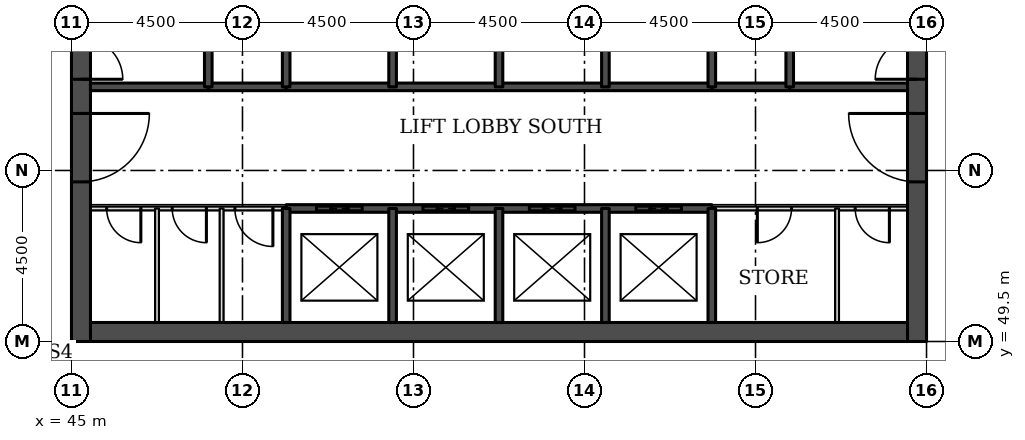
"""IFC4 building model, lengths in metres.
Left out: names, types, materials, properties, quantities, classifications, styles, units other than length and angle.
Written with IfcOpenShell. Run it as: python <this file> out.ifc"""

import sys

from ifc_helpers import new_model, si_unit, direction, frame, frame_2d, origin, place, context, subcontext, project, spatial, rectangle, extrude, element, fill, save


model = new_model("IFC4")
c1 = context("Model", 3, precision=1e-05, world=origin(), true_north=direction((0.0, 1.0)))
c2 = subcontext(c1, "Body", "Model", "MODEL_VIEW")
j1 = project(units=[si_unit("LENGTHUNIT", "METRE"), si_unit("PLANEANGLEUNIT", "RADIAN")], contexts=[c1])
p1 = place(None, origin())
s1 = spatial("IfcSite", under=j1, at=p1, CompositionType="ELEMENT")
p2 = place(p1, origin())
s2 = spatial("IfcBuilding", under=s1, at=p2, CompositionType="ELEMENT")
p3 = place(p2, frame((0.0, 0.0, 18.5)))
s3 = spatial("IfcBuildingStorey", under=s2, at=p3, CompositionType="ELEMENT", Elevation=18.5)
p4 = place(p3, frame((45.5, 49.75, 0.0), z_axis=(0.0, 0.0, 1.0), x_axis=(1.0, 0.0, 0.0)))
e1 = element("IfcWall", 1, at=p4, inside=s3, PredefinedType="SHEAR", context=c2, shape_type="SweptSolid", body=[
    extrude(rectangle(XDim=21.5, YDim=0.5, at=frame_2d((10.75, 0.0))), origin(), (0.0, 0.0, 1.0), 4.6),
])
p5 = place(p3, frame((45.25, 49.5, 0.0), z_axis=(0.0, 0.0, 1.0), x_axis=(0.0, 1.0, 0.0)))
e2 = element("IfcWall", 2, at=p5, inside=s3, PredefinedType="SHEAR", context=c2, shape_type="SweptSolid", body=[
    extrude(rectangle(XDim=22.5, YDim=0.5, at=frame_2d((11.25, 0.0))), origin(), (0.0, 0.0, 1.0), 4.6),
])
p6 = place(p5, frame((4.2, 0.0, 0.0)))
e3 = element("IfcOpeningElement", 3, at=p6, cuts=e2, PredefinedType="OPENING", context=c2, shape_type="SweptSolid", body=[
    extrude(rectangle(XDim=1.8, YDim=2.1, at=frame_2d((0.9, 1.05))), frame((0.0, 0.26, 0.0), z_axis=(0.0, -1.0, 0.0), x_axis=(1.0, 0.0, 0.0)), (0.0, 0.0, 1.0), 0.52),
])
p7 = place(p5, frame((6.9, 0.0, 0.0)))
e4 = element("IfcOpeningElement", 4, at=p7, cuts=e2, PredefinedType="OPENING", context=c2, shape_type="SweptSolid", body=[
    extrude(rectangle(XDim=1.1, YDim=2.1, at=frame_2d((0.55, 1.05))), frame((0.0, 0.26, 0.0), z_axis=(0.0, -1.0, 0.0), x_axis=(1.0, 0.0, 0.0)), (0.0, 0.0, 1.0), 0.52),
])
p8 = place(p5, frame((13.6, 0.0, 0.0)))
e5 = element("IfcOpeningElement", 5, at=p8, cuts=e2, PredefinedType="OPENING", context=c2, shape_type="SweptSolid", body=[
    extrude(rectangle(XDim=1.1, YDim=2.1, at=frame_2d((0.55, 1.05))), frame((0.0, 0.26, 0.0), z_axis=(0.0, -1.0, 0.0), x_axis=(1.0, 0.0, 0.0)), (0.0, 0.0, 1.0), 0.52),
])
p9 = place(p5, frame((16.5, 0.0, 0.0)))
e6 = element("IfcOpeningElement", 6, at=p9, cuts=e2, PredefinedType="OPENING", context=c2, shape_type="SweptSolid", body=[
    extrude(rectangle(XDim=1.8, YDim=2.1, at=frame_2d((0.9, 1.05))), frame((0.0, 0.26, 0.0), z_axis=(0.0, -1.0, 0.0), x_axis=(1.0, 0.0, 0.0)), (0.0, 0.0, 1.0), 0.52),
])
p10 = place(p3, frame((67.25, 49.5, 0.0), z_axis=(0.0, 0.0, 1.0), x_axis=(0.0, 1.0, 0.0)))
e7 = element("IfcWall", 7, at=p10, inside=s3, PredefinedType="SHEAR", context=c2, shape_type="SweptSolid", body=[
    extrude(rectangle(XDim=22.5, YDim=0.5, at=frame_2d((11.25, 0.0))), origin(), (0.0, 0.0, 1.0), 4.6),
])
p11 = place(p10, frame((4.2, 0.0, 0.0)))
e8 = element("IfcOpeningElement", 8, at=p11, cuts=e7, PredefinedType="OPENING", context=c2, shape_type="SweptSolid", body=[
    extrude(rectangle(XDim=1.8, YDim=2.1, at=frame_2d((0.9, 1.05))), frame((0.0, 0.26, 0.0), z_axis=(0.0, -1.0, 0.0), x_axis=(1.0, 0.0, 0.0)), (0.0, 0.0, 1.0), 0.52),
])
p12 = place(p10, frame((6.9, 0.0, 0.0)))
e9 = element("IfcOpeningElement", 9, at=p12, cuts=e7, PredefinedType="OPENING", context=c2, shape_type="SweptSolid", body=[
    extrude(rectangle(XDim=1.1, YDim=2.1, at=frame_2d((0.55, 1.05))), frame((0.0, 0.26, 0.0), z_axis=(0.0, -1.0, 0.0), x_axis=(1.0, 0.0, 0.0)), (0.0, 0.0, 1.0), 0.52),
])
p13 = place(p10, frame((13.6, 0.0, 0.0)))
e10 = element("IfcOpeningElement", 10, at=p13, cuts=e7, PredefinedType="OPENING", context=c2, shape_type="SweptSolid", body=[
    extrude(rectangle(XDim=1.1, YDim=2.1, at=frame_2d((0.55, 1.05))), frame((0.0, 0.26, 0.0), z_axis=(0.0, -1.0, 0.0), x_axis=(1.0, 0.0, 0.0)), (0.0, 0.0, 1.0), 0.52),
])
p14 = place(p10, frame((16.5, 0.0, 0.0)))
e11 = element("IfcOpeningElement", 11, at=p14, cuts=e7, PredefinedType="OPENING", context=c2, shape_type="SweptSolid", body=[
    extrude(rectangle(XDim=1.8, YDim=2.1, at=frame_2d((0.9, 1.05))), frame((0.0, 0.26, 0.0), z_axis=(0.0, -1.0, 0.0), x_axis=(1.0, 0.0, 0.0)), (0.0, 0.0, 1.0), 0.52),
])
p15 = place(p3, frame((45.5, 53.0, 0.0), z_axis=(0.0, 0.0, 1.0), x_axis=(1.0, 0.0, 0.0)))
e12 = element("IfcWall", 12, at=p15, inside=s3, PredefinedType="PARTITIONING", context=c2, shape_type="SweptSolid", body=[
    extrude(rectangle(XDim=5.15, YDim=0.1, at=frame_2d((2.575, 0.0))), origin(), (0.0, 0.0, 1.0), 4.38),
])
p16 = place(p15, frame((0.426, 0.0, 0.0)))
e13 = element("IfcOpeningElement", 13, at=p16, cuts=e12, PredefinedType="OPENING", context=c2, shape_type="SweptSolid", body=[
    extrude(rectangle(XDim=0.9, YDim=2.1, at=frame_2d((0.45, 1.05))), frame((0.0, 0.06, 0.0), z_axis=(0.0, -1.0, 0.0), x_axis=(1.0, 0.0, 0.0)), (0.0, 0.0, 1.0), 0.12),
])
p17 = place(p15, frame((2.151, 0.0, 0.0)))
e14 = element("IfcOpeningElement", 14, at=p17, cuts=e12, PredefinedType="OPENING", context=c2, shape_type="SweptSolid", body=[
    extrude(rectangle(XDim=0.9, YDim=2.1, at=frame_2d((0.45, 1.05))), frame((0.0, 0.06, 0.0), z_axis=(0.0, -1.0, 0.0), x_axis=(1.0, 0.0, 0.0)), (0.0, 0.0, 1.0), 0.12),
])
p18 = place(p15, frame((3.8, 0.0, 0.0)))
e15 = element("IfcOpeningElement", 15, at=p18, cuts=e12, PredefinedType="OPENING", context=c2, shape_type="SweptSolid", body=[
    extrude(rectangle(XDim=1.0, YDim=2.1, at=frame_2d((0.5, 1.05))), frame((0.0, 0.06, 0.0), z_axis=(0.0, -1.0, 0.0), x_axis=(1.0, 0.0, 0.0)), (0.0, 0.0, 1.0), 0.12),
])
p19 = place(p3, frame((61.85, 53.0, 0.0), z_axis=(0.0, 0.0, 1.0), x_axis=(1.0, 0.0, 0.0)))
e16 = element("IfcWall", 16, at=p19, inside=s3, PredefinedType="PARTITIONING", context=c2, shape_type="SweptSolid", body=[
    extrude(rectangle(XDim=5.15, YDim=0.1, at=frame_2d((2.575, 0.0))), origin(), (0.0, 0.0, 1.0), 4.38),
])
p20 = place(p19, frame((3.773, 0.0, 0.0)))
e17 = element("IfcOpeningElement", 17, at=p20, cuts=e16, PredefinedType="OPENING", context=c2, shape_type="SweptSolid", body=[
    extrude(rectangle(XDim=0.9, YDim=2.1, at=frame_2d((0.45, 1.05))), frame((0.0, 0.06, 0.0), z_axis=(0.0, -1.0, 0.0), x_axis=(1.0, 0.0, 0.0)), (0.0, 0.0, 1.0), 0.12),
])
p21 = place(p19, frame((1.198, 0.0, 0.0)))
e18 = element("IfcOpeningElement", 18, at=p21, cuts=e16, PredefinedType="OPENING", context=c2, shape_type="SweptSolid", body=[
    extrude(rectangle(XDim=0.9, YDim=2.1, at=frame_2d((0.45, 1.05))), frame((0.0, 0.06, 0.0), z_axis=(0.0, -1.0, 0.0), x_axis=(1.0, 0.0, 0.0)), (0.0, 0.0, 1.0), 0.12),
])
p22 = place(p3, frame((50.65, 53.0, 0.0), z_axis=(0.0, 0.0, 1.0), x_axis=(1.0, 0.0, 0.0)))
e19 = element("IfcWall", 19, at=p22, inside=s3, PredefinedType="SOLIDWALL", context=c2, shape_type="SweptSolid", body=[
    extrude(rectangle(XDim=11.2, YDim=0.2, at=frame_2d((5.6, 0.0))), origin(), (0.0, 0.0, 1.0), 4.38),
])
p23 = place(p22, frame((0.8, 0.0, 0.0)))
e20 = element("IfcOpeningElement", 20, at=p23, cuts=e19, PredefinedType="OPENING", context=c2, shape_type="SweptSolid", body=[
    extrude(rectangle(XDim=1.2, YDim=2.1, at=frame_2d((0.6, 1.05))), frame((0.0, 0.11, 0.0), z_axis=(0.0, -1.0, 0.0), x_axis=(1.0, 0.0, 0.0)), (0.0, 0.0, 1.0), 0.22),
])
p24 = place(p22, frame((3.6, 0.0, 0.0)))
e21 = element("IfcOpeningElement", 21, at=p24, cuts=e19, PredefinedType="OPENING", context=c2, shape_type="SweptSolid", body=[
    extrude(rectangle(XDim=1.2, YDim=2.1, at=frame_2d((0.6, 1.05))), frame((0.0, 0.11, 0.0), z_axis=(0.0, -1.0, 0.0), x_axis=(1.0, 0.0, 0.0)), (0.0, 0.0, 1.0), 0.22),
])
p25 = place(p22, frame((6.4, 0.0, 0.0)))
e22 = element("IfcOpeningElement", 22, at=p25, cuts=e19, PredefinedType="OPENING", context=c2, shape_type="SweptSolid", body=[
    extrude(rectangle(XDim=1.2, YDim=2.1, at=frame_2d((0.6, 1.05))), frame((0.0, 0.11, 0.0), z_axis=(0.0, -1.0, 0.0), x_axis=(1.0, 0.0, 0.0)), (0.0, 0.0, 1.0), 0.22),
])
p26 = place(p22, frame((9.2, 0.0, 0.0)))
e23 = element("IfcOpeningElement", 23, at=p26, cuts=e19, PredefinedType="OPENING", context=c2, shape_type="SweptSolid", body=[
    extrude(rectangle(XDim=1.2, YDim=2.1, at=frame_2d((0.6, 1.05))), frame((0.0, 0.11, 0.0), z_axis=(0.0, -1.0, 0.0), x_axis=(1.0, 0.0, 0.0)), (0.0, 0.0, 1.0), 0.22),
])
for number, where, z_axis, x_axis in (
    (24, (48.6, 56.2, 0.0), (0.0, 0.0, 1.0), (1.0, 0.0, 0.0)),
    (25, (61.85, 56.2, 0.0), (0.0, 0.0, 1.0), (1.0, 0.0, 0.0)),
):
    element("IfcWall", number, at=place(p3, frame(where, z_axis=z_axis, x_axis=x_axis)), inside=s3, PredefinedType="SOLIDWALL", context=c2, shape_type="SweptSolid", body=[
        extrude(rectangle(XDim=2.05, YDim=0.2, at=frame_2d((1.025, 0.0))), origin(), (0.0, 0.0, 1.0), 4.38),
    ])
p27 = place(p3, frame((45.5, 56.2, 0.0), z_axis=(0.0, 0.0, 1.0), x_axis=(1.0, 0.0, 0.0)))
e26 = element("IfcWall", 26, at=p27, inside=s3, PredefinedType="SOLIDWALL", context=c2, shape_type="SweptSolid", body=[
    extrude(rectangle(XDim=3.1, YDim=0.2, at=frame_2d((1.55, 0.0))), origin(), (0.0, 0.0, 1.0), 4.38),
])
p28 = place(p3, frame((50.65, 56.2, 0.0), z_axis=(0.0, 0.0, 1.0), x_axis=(1.0, 0.0, 0.0)))
e27 = element("IfcWall", 27, at=p28, inside=s3, PredefinedType="SOLIDWALL", context=c2, shape_type="SweptSolid", body=[
    extrude(rectangle(XDim=11.2, YDim=0.2, at=frame_2d((5.6, 0.0))), origin(), (0.0, 0.0, 1.0), 4.38),
])
p29 = place(p3, frame((63.9, 56.2, 0.0), z_axis=(0.0, 0.0, 1.0), x_axis=(1.0, 0.0, 0.0)))
e28 = element("IfcWall", 28, at=p29, inside=s3, PredefinedType="SOLIDWALL", context=c2, shape_type="SweptSolid", body=[
    extrude(rectangle(XDim=3.1, YDim=0.2, at=frame_2d((1.55, 0.0))), origin(), (0.0, 0.0, 1.0), 4.38),
])
p30 = place(p3, frame((47.251, 50.0, 0.0), z_axis=(0.0, 0.0, 1.0), x_axis=(0.0, 1.0, 0.0)))
e29 = element("IfcWall", 29, at=p30, inside=s3, PredefinedType="PARTITIONING", context=c2, shape_type="SweptSolid", body=[
    extrude(rectangle(XDim=3.0, YDim=0.1, at=frame_2d((1.5, 0.0))), origin(), (0.0, 0.0, 1.0), 4.38),
])
p31 = place(p3, frame((48.6, 56.2, 0.0), z_axis=(0.0, 0.0, 1.0), x_axis=(0.0, 1.0, 0.0)))
e30 = element("IfcWall", 30, at=p31, inside=s3, PredefinedType="SOLIDWALL", context=c2, shape_type="SweptSolid", body=[
    extrude(rectangle(XDim=5.8, YDim=0.2, at=frame_2d((2.9, 0.0))), origin(), (0.0, 0.0, 1.0), 4.38),
])
p32 = place(p3, frame((48.95, 50.0, 0.0), z_axis=(0.0, 0.0, 1.0), x_axis=(0.0, 1.0, 0.0)))
e31 = element("IfcWall", 31, at=p32, inside=s3, PredefinedType="PARTITIONING", context=c2, shape_type="SweptSolid", body=[
    extrude(rectangle(XDim=3.0, YDim=0.1, at=frame_2d((1.5, 0.0))), origin(), (0.0, 0.0, 1.0), 4.38),
])
p33 = place(p3, frame((50.65, 50.0, 0.0), z_axis=(0.0, 0.0, 1.0), x_axis=(0.0, 1.0, 0.0)))
e32 = element("IfcWall", 32, at=p33, inside=s3, PredefinedType="SOLIDWALL", context=c2, shape_type="SweptSolid", body=[
    extrude(rectangle(XDim=3.0, YDim=0.2, at=frame_2d((1.5, 0.0))), origin(), (0.0, 0.0, 1.0), 4.38),
])
p34 = place(p3, frame((50.65, 56.2, 0.0), z_axis=(0.0, 0.0, 1.0), x_axis=(0.0, 1.0, 0.0)))
e33 = element("IfcWall", 33, at=p34, inside=s3, PredefinedType="SOLIDWALL", context=c2, shape_type="SweptSolid", body=[
    extrude(rectangle(XDim=2.8, YDim=0.2, at=frame_2d((1.4, 0.0))), origin(), (0.0, 0.0, 1.0), 4.38),
])
p35 = place(p3, frame((53.45, 50.0, 0.0), z_axis=(0.0, 0.0, 1.0), x_axis=(0.0, 1.0, 0.0)))
e34 = element("IfcWall", 34, at=p35, inside=s3, PredefinedType="SOLIDWALL", context=c2, shape_type="SweptSolid", body=[
    extrude(rectangle(XDim=3.0, YDim=0.2, at=frame_2d((1.5, 0.0))), origin(), (0.0, 0.0, 1.0), 4.38),
])
p36 = place(p3, frame((53.45, 56.2, 0.0), z_axis=(0.0, 0.0, 1.0), x_axis=(0.0, 1.0, 0.0)))
e35 = element("IfcWall", 35, at=p36, inside=s3, PredefinedType="SOLIDWALL", context=c2, shape_type="SweptSolid", body=[
    extrude(rectangle(XDim=2.8, YDim=0.2, at=frame_2d((1.4, 0.0))), origin(), (0.0, 0.0, 1.0), 4.38),
])
p37 = place(p3, frame((56.25, 50.0, 0.0), z_axis=(0.0, 0.0, 1.0), x_axis=(0.0, 1.0, 0.0)))
e36 = element("IfcWall", 36, at=p37, inside=s3, PredefinedType="SOLIDWALL", context=c2, shape_type="SweptSolid", body=[
    extrude(rectangle(XDim=3.0, YDim=0.2, at=frame_2d((1.5, 0.0))), origin(), (0.0, 0.0, 1.0), 4.38),
])
p38 = place(p3, frame((56.25, 56.2, 0.0), z_axis=(0.0, 0.0, 1.0), x_axis=(0.0, 1.0, 0.0)))
e37 = element("IfcWall", 37, at=p38, inside=s3, PredefinedType="SOLIDWALL", context=c2, shape_type="SweptSolid", body=[
    extrude(rectangle(XDim=2.8, YDim=0.2, at=frame_2d((1.4, 0.0))), origin(), (0.0, 0.0, 1.0), 4.38),
])
p39 = place(p3, frame((59.05, 50.0, 0.0), z_axis=(0.0, 0.0, 1.0), x_axis=(0.0, 1.0, 0.0)))
e38 = element("IfcWall", 38, at=p39, inside=s3, PredefinedType="SOLIDWALL", context=c2, shape_type="SweptSolid", body=[
    extrude(rectangle(XDim=3.0, YDim=0.2, at=frame_2d((1.5, 0.0))), origin(), (0.0, 0.0, 1.0), 4.38),
])
p40 = place(p3, frame((59.05, 56.2, 0.0), z_axis=(0.0, 0.0, 1.0), x_axis=(0.0, 1.0, 0.0)))
e39 = element("IfcWall", 39, at=p40, inside=s3, PredefinedType="SOLIDWALL", context=c2, shape_type="SweptSolid", body=[
    extrude(rectangle(XDim=2.8, YDim=0.2, at=frame_2d((1.4, 0.0))), origin(), (0.0, 0.0, 1.0), 4.38),
])
p41 = place(p3, frame((61.85, 50.0, 0.0), z_axis=(0.0, 0.0, 1.0), x_axis=(0.0, 1.0, 0.0)))
e40 = element("IfcWall", 40, at=p41, inside=s3, PredefinedType="SOLIDWALL", context=c2, shape_type="SweptSolid", body=[
    extrude(rectangle(XDim=3.0, YDim=0.2, at=frame_2d((1.5, 0.0))), origin(), (0.0, 0.0, 1.0), 4.38),
])
p42 = place(p3, frame((61.85, 56.2, 0.0), z_axis=(0.0, 0.0, 1.0), x_axis=(0.0, 1.0, 0.0)))
e41 = element("IfcWall", 41, at=p42, inside=s3, PredefinedType="SOLIDWALL", context=c2, shape_type="SweptSolid", body=[
    extrude(rectangle(XDim=2.8, YDim=0.2, at=frame_2d((1.4, 0.0))), origin(), (0.0, 0.0, 1.0), 4.38),
])
p43 = place(p3, frame((63.9, 56.2, 0.0), z_axis=(0.0, 0.0, 1.0), x_axis=(0.0, 1.0, 0.0)))
e42 = element("IfcWall", 42, at=p43, inside=s3, PredefinedType="SOLIDWALL", context=c2, shape_type="SweptSolid", body=[
    extrude(rectangle(XDim=5.8, YDim=0.2, at=frame_2d((2.9, 0.0))), origin(), (0.0, 0.0, 1.0), 4.38),
])
p44 = place(p3, frame((65.146, 50.0, 0.0), z_axis=(0.0, 0.0, 1.0), x_axis=(0.0, 1.0, 0.0)))
e43 = element("IfcWall", 43, at=p44, inside=s3, PredefinedType="PARTITIONING", context=c2, shape_type="SweptSolid", body=[
    extrude(rectangle(XDim=3.0, YDim=0.1, at=frame_2d((1.5, 0.0))), origin(), (0.0, 0.0, 1.0), 4.38),
])
p45 = place(p23, origin())
e44 = element("IfcDoor", 44, at=p45, inside=s3, OperationType="DOUBLE_DOOR_SLIDING", PredefinedType="DOOR", context=c2, shape_type="SweptSolid", body=[
    extrude(rectangle(XDim=1.2, YDim=2.1, at=frame_2d((0.6, 1.05))), frame((0.0, 0.025, 0.0), z_axis=(0.0, -1.0, 0.0), x_axis=(1.0, 0.0, 0.0)), (0.0, 0.0, 1.0), 0.05),
])
fill(e20, e44)
p46 = place(p24, origin())
e45 = element("IfcDoor", 45, at=p46, inside=s3, OperationType="DOUBLE_DOOR_SLIDING", PredefinedType="DOOR", context=c2, shape_type="SweptSolid", body=[
    extrude(rectangle(XDim=1.2, YDim=2.1, at=frame_2d((0.6, 1.05))), frame((0.0, 0.025, 0.0), z_axis=(0.0, -1.0, 0.0), x_axis=(1.0, 0.0, 0.0)), (0.0, 0.0, 1.0), 0.05),
])
fill(e21, e45)
p47 = place(p25, origin())
e46 = element("IfcDoor", 46, at=p47, inside=s3, OperationType="DOUBLE_DOOR_SLIDING", PredefinedType="DOOR", context=c2, shape_type="SweptSolid", body=[
    extrude(rectangle(XDim=1.2, YDim=2.1, at=frame_2d((0.6, 1.05))), frame((0.0, 0.025, 0.0), z_axis=(0.0, -1.0, 0.0), x_axis=(1.0, 0.0, 0.0)), (0.0, 0.0, 1.0), 0.05),
])
fill(e22, e46)
p48 = place(p26, origin())
e47 = element("IfcDoor", 47, at=p48, inside=s3, OperationType="DOUBLE_DOOR_SLIDING", PredefinedType="DOOR", context=c2, shape_type="SweptSolid", body=[
    extrude(rectangle(XDim=1.2, YDim=2.1, at=frame_2d((0.6, 1.05))), frame((0.0, 0.025, 0.0), z_axis=(0.0, -1.0, 0.0), x_axis=(1.0, 0.0, 0.0)), (0.0, 0.0, 1.0), 0.05),
])
fill(e23, e47)
p49 = place(p6, frame((1.8, 0.0, 0.0), z_axis=(0.0, 0.0, 1.0), x_axis=(-1.0, 0.0, 0.0)))
e48 = element("IfcDoor", 48, at=p49, inside=s3, OperationType="SINGLE_SWING_LEFT", PredefinedType="DOOR", context=c2, shape_type="SweptSolid", body=[
    extrude(rectangle(XDim=1.8, YDim=2.1, at=frame_2d((0.9, 1.05))), frame((0.0, 0.025, 0.0), z_axis=(0.0, -1.0, 0.0), x_axis=(1.0, 0.0, 0.0)), (0.0, 0.0, 1.0), 0.05),
])
fill(e3, e48)
p50 = place(p7, frame((1.1, 0.0, 0.0), z_axis=(0.0, 0.0, 1.0), x_axis=(-1.0, 0.0, 0.0)))
e49 = element("IfcDoor", 49, at=p50, inside=s3, OperationType="SINGLE_SWING_RIGHT", PredefinedType="DOOR", context=c2, shape_type="SweptSolid", body=[
    extrude(rectangle(XDim=1.1, YDim=2.1, at=frame_2d((0.55, 1.05))), frame((0.0, 0.025, 0.0), z_axis=(0.0, -1.0, 0.0), x_axis=(1.0, 0.0, 0.0)), (0.0, 0.0, 1.0), 0.05),
])
fill(e4, e49)
p51 = place(p11, origin())
e50 = element("IfcDoor", 50, at=p51, inside=s3, OperationType="SINGLE_SWING_RIGHT", PredefinedType="DOOR", context=c2, shape_type="SweptSolid", body=[
    extrude(rectangle(XDim=1.8, YDim=2.1, at=frame_2d((0.9, 1.05))), frame((0.0, 0.025, 0.0), z_axis=(0.0, -1.0, 0.0), x_axis=(1.0, 0.0, 0.0)), (0.0, 0.0, 1.0), 0.05),
])
fill(e8, e50)
p52 = place(p12, origin())
e51 = element("IfcDoor", 51, at=p52, inside=s3, OperationType="SINGLE_SWING_LEFT", PredefinedType="DOOR", context=c2, shape_type="SweptSolid", body=[
    extrude(rectangle(XDim=1.1, YDim=2.1, at=frame_2d((0.55, 1.05))), frame((0.0, 0.025, 0.0), z_axis=(0.0, -1.0, 0.0), x_axis=(1.0, 0.0, 0.0)), (0.0, 0.0, 1.0), 0.05),
])
fill(e9, e51)
p53 = place(p20, frame((0.9, 0.0, 0.0), z_axis=(0.0, 0.0, 1.0), x_axis=(-1.0, 0.0, 0.0)))
e52 = element("IfcDoor", 52, at=p53, inside=s3, OperationType="SINGLE_SWING_LEFT", PredefinedType="DOOR", context=c2, shape_type="SweptSolid", body=[
    extrude(rectangle(XDim=0.9, YDim=2.1, at=frame_2d((0.45, 1.05))), frame((0.0, 0.025, 0.0), z_axis=(0.0, -1.0, 0.0), x_axis=(1.0, 0.0, 0.0)), (0.0, 0.0, 1.0), 0.05),
])
fill(e17, e52)
p54 = place(p21, frame((0.9, 0.0, 0.0), z_axis=(0.0, 0.0, 1.0), x_axis=(-1.0, 0.0, 0.0)))
e53 = element("IfcDoor", 53, at=p54, inside=s3, OperationType="SINGLE_SWING_RIGHT", PredefinedType="DOOR", context=c2, shape_type="SweptSolid", body=[
    extrude(rectangle(XDim=0.9, YDim=2.1, at=frame_2d((0.45, 1.05))), frame((0.0, 0.025, 0.0), z_axis=(0.0, -1.0, 0.0), x_axis=(1.0, 0.0, 0.0)), (0.0, 0.0, 1.0), 0.05),
])
fill(e18, e53)
p55 = place(p16, frame((0.9, 0.0, 0.0), z_axis=(0.0, 0.0, 1.0), x_axis=(-1.0, 0.0, 0.0)))
e54 = element("IfcDoor", 54, at=p55, inside=s3, OperationType="SINGLE_SWING_LEFT", PredefinedType="DOOR", context=c2, shape_type="SweptSolid", body=[
    extrude(rectangle(XDim=0.9, YDim=2.1, at=frame_2d((0.45, 1.05))), frame((0.0, 0.025, 0.0), z_axis=(0.0, -1.0, 0.0), x_axis=(1.0, 0.0, 0.0)), (0.0, 0.0, 1.0), 0.05),
])
fill(e13, e54)
p56 = place(p17, frame((0.9, 0.0, 0.0), z_axis=(0.0, 0.0, 1.0), x_axis=(-1.0, 0.0, 0.0)))
e55 = element("IfcDoor", 55, at=p56, inside=s3, OperationType="SINGLE_SWING_LEFT", PredefinedType="DOOR", context=c2, shape_type="SweptSolid", body=[
    extrude(rectangle(XDim=0.9, YDim=2.1, at=frame_2d((0.45, 1.05))), frame((0.0, 0.025, 0.0), z_axis=(0.0, -1.0, 0.0), x_axis=(1.0, 0.0, 0.0)), (0.0, 0.0, 1.0), 0.05),
])
fill(e14, e55)
p57 = place(p18, frame((1.0, 0.0, 0.0), z_axis=(0.0, 0.0, 1.0), x_axis=(-1.0, 0.0, 0.0)))
e56 = element("IfcDoor", 56, at=p57, inside=s3, OperationType="SINGLE_SWING_LEFT", PredefinedType="DOOR", context=c2, shape_type="SweptSolid", body=[
    extrude(rectangle(XDim=1.0, YDim=2.1, at=frame_2d((0.5, 1.05))), frame((0.0, 0.025, 0.0), z_axis=(0.0, -1.0, 0.0), x_axis=(1.0, 0.0, 0.0)), (0.0, 0.0, 1.0), 0.05),
])
fill(e15, e56)
save(model, sys.argv[1])
